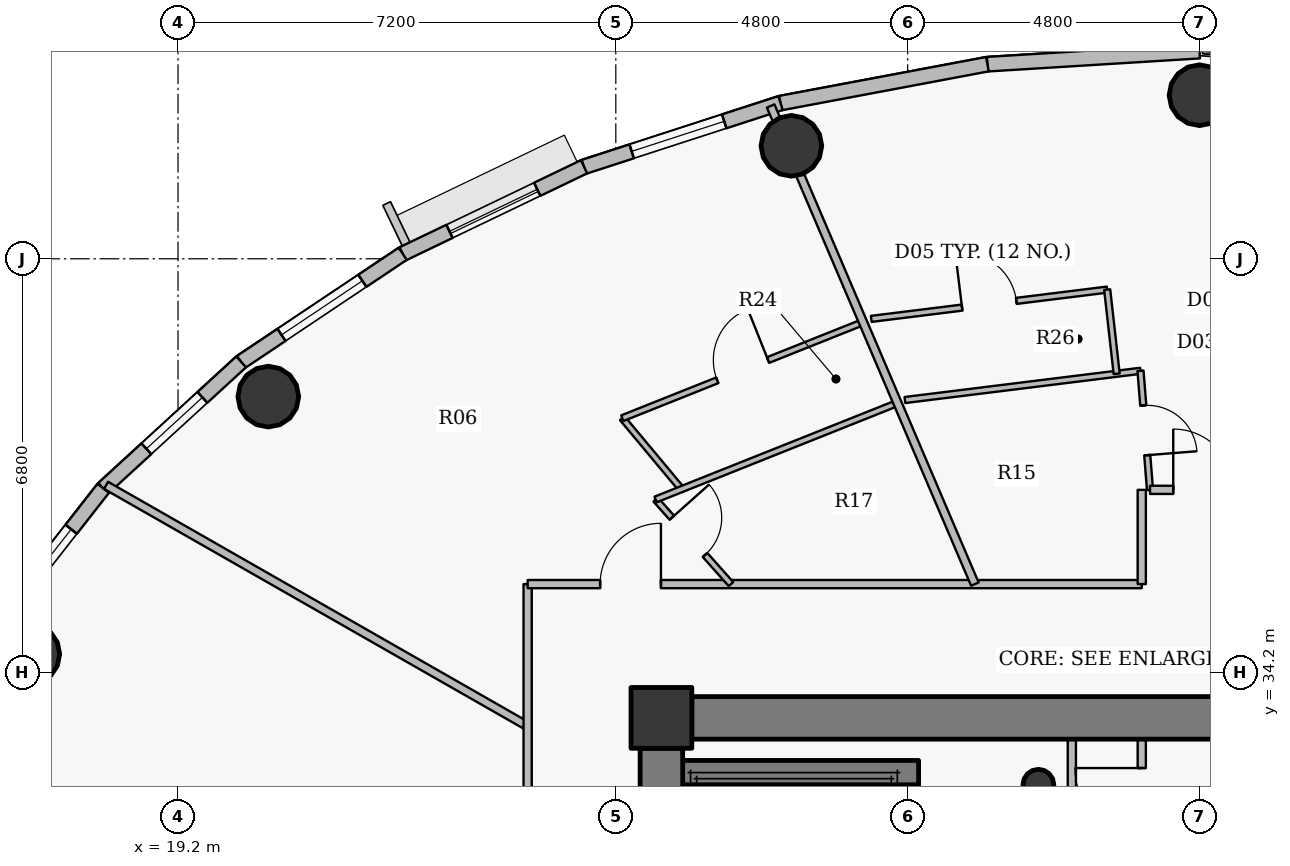
"""IFC4 building model, lengths in metres.
Left out: names, types, materials, properties, quantities, classifications, styles, units other than length and angle.
Written with IfcOpenShell. Run it as: python <this file> out.ifc"""

import sys

from ifc_helpers import new_model, si_unit, direction, frame, frame_2d, origin, origin_2d, place, context, subcontext, project, spatial, rectangle, hollow_circle, extrude, source, transform, mapped, element, fill, save


model = new_model("IFC4")
c1 = context("Model", 3, precision=1e-05, world=origin(), true_north=direction((0.0, 1.0)))
c2 = subcontext(c1, "Body", "Model", "MODEL_VIEW")
j1 = project(units=[si_unit("LENGTHUNIT", "METRE"), si_unit("PLANEANGLEUNIT", "RADIAN")], contexts=[c1])
p1 = place(None, origin())
s1 = spatial("IfcSite", under=j1, at=p1, CompositionType="ELEMENT")
p2 = place(p1, origin())
s2 = spatial("IfcBuilding", under=s1, at=p2, CompositionType="ELEMENT")
p3 = place(p2, frame((0.0, 0.0, 295.5)))
s3 = spatial("IfcBuildingStorey", under=s2, at=p3, CompositionType="ELEMENT", Elevation=295.5)
p4 = place(p3, frame((27.15, 33.45, 0.0), z_axis=(0.0, 0.0, 1.0), x_axis=(1.0, 0.0, 0.0)))
e1 = element("IfcColumn", 1, at=p4, inside=s3, PredefinedType="COLUMN", context=c2, shape_type="SweptSolid", body=[
    extrude(rectangle(XDim=1.0, YDim=1.0, at=origin_2d()), origin(), (0.0, 0.0, 1.0), 3.75),
])
p5 = place(p3, frame((33.35, 32.35, 0.0), z_axis=(0.0, 0.0, 1.0), x_axis=(1.0, 0.0, 0.0)))
e2 = element("IfcColumn", 2, at=p5, inside=s3, PredefinedType="COLUMN", context=c2, shape_type="SweptSolid", body=[
    extrude(hollow_circle(Radius=0.254, WallThickness=0.02, at=origin_2d()), origin(), (0.0, 0.0, 1.0), 3.75),
])
p6 = place(p3, frame((31.18, 27.8, 0.0), z_axis=(0.0, 0.0, 1.0), x_axis=(0.0, 1.0, 0.0)))
e3 = element("IfcWall", 3, at=p6, inside=s3, PredefinedType="SHEAR", context=c2, shape_type="SweptSolid", body=[
    extrude(rectangle(XDim=4.75, YDim=0.4, at=frame_2d((2.375, 0.0))), origin(), (0.0, 0.0, 1.0), 3.75),
])
p7 = place(p3, frame((27.25, 32.55, 0.0), z_axis=(0.0, 0.0, 1.0), x_axis=(1.0, 0.0, 0.0)))
e4 = element("IfcWall", 4, at=p7, inside=s3, PredefinedType="SHEAR", context=c2, shape_type="SweptSolid", body=[
    extrude(rectangle(XDim=4.13, YDim=0.4, at=frame_2d((2.065, 0.0))), origin(), (0.0, 0.0, 1.0), 3.75),
])
p8 = place(p3, frame((27.65, 33.45, 0.0), z_axis=(0.0, 0.0, 1.0), x_axis=(1.0, 0.0, 0.0)))
e5 = element("IfcWall", 5, at=p8, inside=s3, PredefinedType="SHEAR", context=c2, shape_type="SweptSolid", body=[
    extrude(rectangle(XDim=16.7, YDim=0.7, at=frame_2d((8.35, 0.0))), origin(), (0.0, 0.0, 1.0), 3.05),
])
p9 = place(p8, frame((12.775, 0.0, 0.0)))
e6 = element("IfcOpeningElement", 6, at=p9, cuts=e5, PredefinedType="OPENING", context=c2, shape_type="SweptSolid", body=[
    extrude(rectangle(XDim=1.15, YDim=2.15, at=origin_2d()), frame((0.575, 0.36, 1.075), z_axis=(0.0, -1.0, 0.0), x_axis=(1.0, 0.0, 0.0)), (0.0, 0.0, 1.0), 0.72),
])
p10 = place(p3, frame((27.15, 21.05, 0.0), z_axis=(0.0, 0.0, 1.0), x_axis=(0.0, 1.0, 0.0)))
e7 = element("IfcWall", 7, at=p10, inside=s3, PredefinedType="SHEAR", context=c2, shape_type="SweptSolid", body=[
    extrude(rectangle(XDim=11.9, YDim=0.7, at=frame_2d((5.95, 0.0))), origin(), (0.0, 0.0, 1.0), 3.05),
])
for number, where, z_axis, x_axis in (
    (8, (36.0, 43.69, 0.0), (0.0, 0.0, 1.0), (1.0, 0.0, 0.0)),
    (9, (29.288, 42.858, 0.0), (0.0, 0.0, 1.0), (1.0, 0.0, 0.0)),
    (10, (20.685, 38.733, 0.0), (0.0, 0.0, 1.0), (1.0, 0.0, 0.0)),
    (11, (16.754, 34.5, 0.0), (0.0, 0.0, 1.0), (1.0, 0.0, 0.0)),
):
    element("IfcColumn", number, at=place(p3, frame(where, z_axis=z_axis, x_axis=x_axis)), inside=s3, PredefinedType="COLUMN", context=c2, shape_type="SweptSolid", body=[
        extrude(hollow_circle(Radius=0.5, WallThickness=0.032, at=origin_2d()), origin(), (0.0, 0.0, 1.0), 3.75),
    ])
p11 = place(p3, frame((32.511, 44.2, 0.0), z_axis=(0.0, 0.0, 1.0), x_axis=(0.998104946479, 0.061534671648, 0.0)))
e12 = element("IfcWall", 12, at=p11, inside=s3, PredefinedType="SOLIDWALL", context=c2, shape_type="SweptSolid", body=[
    extrude(rectangle(XDim=3.495, YDim=0.24, at=frame_2d((1.748, 0.0))), origin(), (0.0, 0.0, 1.0), 3.5),
])
p12 = place(p3, frame((29.109, 43.56, 0.0), z_axis=(0.0, 0.0, 1.0), x_axis=(0.982782655757, 0.184765395959, 0.0)))
e13 = element("IfcWall", 13, at=p12, inside=s3, PredefinedType="SOLIDWALL", context=c2, shape_type="SweptSolid", body=[
    extrude(rectangle(XDim=3.462, YDim=0.24, at=frame_2d((1.731, 0.0))), origin(), (0.0, 0.0, 1.0), 3.5),
])
p13 = place(p3, frame((25.877, 42.512, 0.0), z_axis=(0.0, 0.0, 1.0), x_axis=(0.95123136723, 0.308478339592, 0.0)))
e14 = element("IfcWall", 14, at=p13, inside=s3, PredefinedType="SOLIDWALL", context=c2, shape_type="SweptSolid", body=[
    extrude(rectangle(XDim=3.398, YDim=0.24, at=frame_2d((1.699, 0.0))), origin(), (0.0, 0.0, 1.0), 3.5),
])
p14 = place(p13, frame((0.824, 0.0, 0.9)))
e15 = element("IfcOpeningElement", 15, at=p14, cuts=e14, PredefinedType="OPENING", context=c2, shape_type="SweptSolid", body=[
    extrude(rectangle(XDim=1.6, YDim=1.75, at=origin_2d()), frame((0.8, 0.13, 0.875), z_axis=(0.0, -1.0, 0.0), x_axis=(1.0, 0.0, 0.0)), (0.0, 0.0, 1.0), 0.26),
])
p15 = place(p3, frame((22.896, 41.082, 0.0), z_axis=(0.0, 0.0, 1.0), x_axis=(0.901573741254, 0.43262546051, 0.0)))
e16 = element("IfcWall", 16, at=p15, inside=s3, PredefinedType="SOLIDWALL", context=c2, shape_type="SweptSolid", body=[
    extrude(rectangle(XDim=3.307, YDim=0.24, at=frame_2d((1.653, 0.0))), origin(), (0.0, 0.0, 1.0), 3.5),
])
p16 = place(p15, frame((0.854, 0.0, 0.9)))
e17 = element("IfcOpeningElement", 17, at=p16, cuts=e16, PredefinedType="OPENING", context=c2, shape_type="SweptSolid", body=[
    extrude(rectangle(XDim=1.6, YDim=1.75, at=origin_2d()), frame((0.8, 0.13, 0.875), z_axis=(0.0, -1.0, 0.0), x_axis=(1.0, 0.0, 0.0)), (0.0, 0.0, 1.0), 0.26),
])
p17 = place(p3, frame((20.238, 39.304, 0.0), z_axis=(0.0, 0.0, 1.0), x_axis=(0.831250592635, 0.55589787933, 0.0)))
e18 = element("IfcWall", 18, at=p17, inside=s3, PredefinedType="SOLIDWALL", context=c2, shape_type="SweptSolid", body=[
    extrude(rectangle(XDim=3.197, YDim=0.24, at=frame_2d((1.599, 0.0))), origin(), (0.0, 0.0, 1.0), 3.5),
])
p18 = place(p17, frame((0.799, 0.0, 0.9)))
e19 = element("IfcOpeningElement", 19, at=p18, cuts=e18, PredefinedType="OPENING", context=c2, shape_type="SweptSolid", body=[
    extrude(rectangle(XDim=1.6, YDim=1.75, at=origin_2d()), frame((0.8, 0.13, 0.875), z_axis=(0.0, -1.0, 0.0), x_axis=(1.0, 0.0, 0.0)), (0.0, 0.0, 1.0), 0.26),
])
p19 = place(p3, frame((17.97, 37.225, 0.0), z_axis=(0.0, 0.0, 1.0), x_axis=(0.737068506972, 0.675818034703, 0.0)))
e20 = element("IfcWall", 20, at=p19, inside=s3, PredefinedType="SOLIDWALL", context=c2, shape_type="SweptSolid", body=[
    extrude(rectangle(XDim=3.077, YDim=0.24, at=frame_2d((1.539, 0.0))), origin(), (0.0, 0.0, 1.0), 3.5),
])
p20 = place(p19, frame((0.963, 0.0, 0.9)))
e21 = element("IfcOpeningElement", 21, at=p20, cuts=e20, PredefinedType="OPENING", context=c2, shape_type="SweptSolid", body=[
    extrude(rectangle(XDim=1.25, YDim=1.65, at=origin_2d()), frame((0.625, 0.13, 0.825), z_axis=(0.0, -1.0, 0.0), x_axis=(1.0, 0.0, 0.0)), (0.0, 0.0, 1.0), 0.26),
])
p21 = place(p3, frame((16.146, 34.895, 0.0), z_axis=(0.0, 0.0, 1.0), x_axis=(0.616337186556, 0.787482363275, 0.0)))
e22 = element("IfcWall", 22, at=p21, inside=s3, PredefinedType="SOLIDWALL", context=c2, shape_type="SweptSolid", body=[
    extrude(rectangle(XDim=2.958, YDim=0.24, at=frame_2d((1.479, 0.0))), origin(), (0.0, 0.0, 1.0), 3.5),
])
p22 = place(p21, frame((0.854, 0.0, 0.9)))
e23 = element("IfcOpeningElement", 23, at=p22, cuts=e22, PredefinedType="OPENING", context=c2, shape_type="SweptSolid", body=[
    extrude(rectangle(XDim=1.25, YDim=1.65, at=origin_2d()), frame((0.625, 0.13, 0.825), z_axis=(0.0, -1.0, 0.0), x_axis=(1.0, 0.0, 0.0)), (0.0, 0.0, 1.0), 0.26),
])
p23 = place(p3, frame((18.016, 37.274, 0.0), z_axis=(0.0, 0.0, 1.0), x_axis=(0.868277005727, -0.496079672357, 0.0)))
e24 = element("IfcWall", 24, at=p23, inside=s3, PredefinedType="PARTITIONING", context=c2, shape_type="SweptSolid", body=[
    extrude(rectangle(XDim=7.985, YDim=0.135, at=frame_2d((3.993, 0.0))), origin(), (0.0, 0.0, 1.0), 2.985),
])
p24 = place(p3, frame((24.95, 31.65, 0.0), z_axis=(0.0, 0.0, 1.0), x_axis=(0.0, 1.0, 0.0)))
e25 = element("IfcWall", 25, at=p24, inside=s3, PredefinedType="PARTITIONING", context=c2, shape_type="SweptSolid", body=[
    extrude(rectangle(XDim=4.0, YDim=0.135, at=frame_2d((2.0, 0.0))), origin(), (0.0, 0.0, 1.0), 3.035),
])
p25 = place(p3, frame((24.95, 35.65, 0.0), z_axis=(0.0, 0.0, 1.0), x_axis=(1.0, 0.0, 0.0)))
e26 = element("IfcWall", 26, at=p25, inside=s3, PredefinedType="PARTITIONING", context=c2, shape_type="SweptSolid", body=[
    extrude(rectangle(XDim=10.1, YDim=0.135, at=frame_2d((5.05, 0.0))), origin(), (0.0, 0.0, 1.0), 3.035),
])
p26 = place(p25, frame((1.192, 0.0, 0.0)))
e27 = element("IfcOpeningElement", 27, at=p26, cuts=e26, PredefinedType="OPENING", context=c2, shape_type="SweptSolid", body=[
    extrude(rectangle(XDim=1.0, YDim=2.15, at=origin_2d()), frame((0.5, 0.078, 1.075), z_axis=(0.0, -1.0, 0.0), x_axis=(1.0, 0.0, 0.0)), (0.0, 0.0, 1.0), 0.155),
])
p27 = place(p3, frame((26.507, 38.378, 0.0), z_axis=(0.0, 0.0, 1.0), x_axis=(0.640626707989, -0.767852473468, 0.0)))
e28 = element("IfcWall", 28, at=p27, inside=s3, PredefinedType="PARTITIONING", context=c2, shape_type="SweptSolid", body=[
    extrude(rectangle(XDim=1.52, YDim=0.1, at=frame_2d((0.76, 0.0))), origin(), (0.0, 0.0, 1.0), 3.5),
])
p28 = place(p3, frame((26.507, 38.378, 0.0), z_axis=(0.0, 0.0, 1.0), x_axis=(0.928788495711, 0.370610213345, 0.0)))
e29 = element("IfcWall", 29, at=p28, inside=s3, PredefinedType="PARTITIONING", context=c2, shape_type="SweptSolid", body=[
    extrude(rectangle(XDim=4.261, YDim=0.1, at=frame_2d((2.131, 0.0))), origin(), (0.0, 0.0, 1.0), 3.035),
])
p29 = place(p28, frame((1.681, 0.0, 0.0)))
e30 = element("IfcOpeningElement", 30, at=p29, cuts=e29, PredefinedType="OPENING", context=c2, shape_type="SweptSolid", body=[
    extrude(rectangle(XDim=0.9, YDim=2.1, at=origin_2d()), frame((0.45, 0.06, 1.05), z_axis=(0.0, -1.0, 0.0), x_axis=(1.0, 0.0, 0.0)), (0.0, 0.0, 1.0), 0.12),
])
p30 = place(p3, frame((27.055, 37.042, 0.0), z_axis=(0.0, 0.0, 1.0), x_axis=(0.665119722178, -0.746736737525, 0.0)))
e31 = element("IfcWall", 31, at=p30, inside=s3, PredefinedType="PARTITIONING", context=c2, shape_type="SweptSolid", body=[
    extrude(rectangle(XDim=1.864, YDim=0.1, at=frame_2d((0.932, 0.0))), origin(), (0.0, 0.0, 1.0), 3.5),
])
p31 = place(p30, frame((0.401, 0.0, 0.0)))
e32 = element("IfcOpeningElement", 32, at=p31, cuts=e31, PredefinedType="OPENING", context=c2, shape_type="SweptSolid", body=[
    extrude(rectangle(XDim=0.82, YDim=2.1, at=origin_2d()), frame((0.41, 0.06, 1.05), z_axis=(0.0, -1.0, 0.0), x_axis=(1.0, 0.0, 0.0)), (0.0, 0.0, 1.0), 0.12),
])
p32 = place(p3, frame((27.055, 37.042, 0.0), z_axis=(0.0, 0.0, 1.0), x_axis=(0.928814416372, 0.370545246819, 0.0)))
e33 = element("IfcWall", 33, at=p32, inside=s3, PredefinedType="PARTITIONING", context=c2, shape_type="SweptSolid", body=[
    extrude(rectangle(XDim=4.283, YDim=0.1, at=frame_2d((2.141, 0.0))), origin(), (0.0, 0.0, 1.0), 3.035),
])
p33 = place(p3, frame((28.946, 43.513, 0.0), z_axis=(0.0, 0.0, 1.0), x_axis=(0.392833513872, -0.919609607594, 0.0)))
e34 = element("IfcWall", 34, at=p33, inside=s3, PredefinedType="PARTITIONING", context=c2, shape_type="SweptSolid", body=[
    extrude(rectangle(XDim=8.55, YDim=0.135, at=frame_2d((4.275, 0.0))), origin(), (0.0, 0.0, 1.0), 3.035),
])
p34 = place(p3, frame((30.601, 40.011, 0.0), z_axis=(0.0, 0.0, 1.0), x_axis=(0.992391758007, 0.123120260886, 0.0)))
e35 = element("IfcWall", 35, at=p34, inside=s3, PredefinedType="PARTITIONING", context=c2, shape_type="SweptSolid", body=[
    extrude(rectangle(XDim=3.91, YDim=0.1, at=frame_2d((1.955, 0.0))), origin(), (0.0, 0.0, 1.0), 3.035),
])
p35 = place(p34, frame((1.505, 0.0, 0.0)))
e36 = element("IfcOpeningElement", 36, at=p35, cuts=e35, PredefinedType="OPENING", context=c2, shape_type="SweptSolid", body=[
    extrude(rectangle(XDim=0.9, YDim=2.1, at=origin_2d()), frame((0.45, 0.06, 1.05), z_axis=(0.0, -1.0, 0.0), x_axis=(1.0, 0.0, 0.0)), (0.0, 0.0, 1.0), 0.12),
])
p36 = place(p3, frame((31.155, 38.677, 0.0), z_axis=(0.0, 0.0, 1.0), x_axis=(0.992398620659, 0.123064932921, 0.0)))
e37 = element("IfcWall", 37, at=p36, inside=s3, PredefinedType="PARTITIONING", context=c2, shape_type="SweptSolid", body=[
    extrude(rectangle(XDim=3.904, YDim=0.1, at=frame_2d((1.952, 0.0))), origin(), (0.0, 0.0, 1.0), 3.035),
])
p37 = place(p3, frame((33.9, 27.56, 0.0), z_axis=(0.0, 0.0, 1.0), x_axis=(0.0, 1.0, 0.0)))
e38 = element("IfcWall", 38, at=p37, inside=s3, PredefinedType="PARTITIONING", context=c2, shape_type="SweptSolid", body=[
    extrude(rectangle(XDim=5.54, YDim=0.135, at=frame_2d((2.77, 0.0))), origin(), (0.0, 0.0, 1.0), 3.085),
])
p38 = place(p37, frame((2.22, 0.0, 0.0)))
e39 = element("IfcOpeningElement", 39, at=p38, cuts=e38, PredefinedType="OPENING", context=c2, shape_type="SweptSolid", body=[
    extrude(rectangle(XDim=1.1, YDim=2.15, at=origin_2d()), frame((0.55, 0.078, 1.075), z_axis=(0.0, -1.0, 0.0), x_axis=(1.0, 0.0, 0.0)), (0.0, 0.0, 1.0), 0.155),
])
p39 = place(p3, frame((34.481, 40.493, 0.0), z_axis=(0.0, 0.0, 1.0), x_axis=(0.111835884353, -0.993726690278, 0.0)))
e40 = element("IfcWall", 40, at=p39, inside=s3, PredefinedType="PARTITIONING", context=c2, shape_type="SweptSolid", body=[
    extrude(rectangle(XDim=1.393, YDim=0.1, at=frame_2d((0.696, 0.0))), origin(), (0.0, 0.0, 1.0), 3.035),
])
p40 = place(p3, frame((35.029, 39.158, 0.0), z_axis=(0.0, 0.0, 1.0), x_axis=(0.079557473452, -0.996830280649, 0.0)))
e41 = element("IfcWall", 41, at=p40, inside=s3, PredefinedType="PARTITIONING", context=c2, shape_type="SweptSolid", body=[
    extrude(rectangle(XDim=1.964, YDim=0.1, at=frame_2d((0.982, 0.0))), origin(), (0.0, 0.0, 1.0), 3.5),
])
p41 = place(p40, frame((0.572, 0.0, 0.0)))
e42 = element("IfcOpeningElement", 42, at=p41, cuts=e41, PredefinedType="OPENING", context=c2, shape_type="SweptSolid", body=[
    extrude(rectangle(XDim=0.82, YDim=2.1, at=origin_2d()), frame((0.41, 0.06, 1.05), z_axis=(0.0, -1.0, 0.0), x_axis=(1.0, 0.0, 0.0)), (0.0, 0.0, 1.0), 0.12),
])
p42 = place(p3, frame((35.05, 31.05, 0.0), z_axis=(0.0, 0.0, 1.0), x_axis=(0.0, 1.0, 0.0)))
e43 = element("IfcWall", 43, at=p42, inside=s3, PredefinedType="PARTITIONING", context=c2, shape_type="SweptSolid", body=[
    extrude(rectangle(XDim=2.05, YDim=0.135, at=frame_2d((1.025, 0.0))), origin(), (0.0, 0.0, 1.0), 3.085),
])
p43 = place(p42, frame((0.475, 0.0, 0.0)))
e44 = element("IfcOpeningElement", 44, at=p43, cuts=e43, PredefinedType="OPENING", context=c2, shape_type="SweptSolid", body=[
    extrude(rectangle(XDim=1.1, YDim=2.15, at=origin_2d()), frame((0.55, 0.078, 1.075), z_axis=(0.0, -1.0, 0.0), x_axis=(1.0, 0.0, 0.0)), (0.0, 0.0, 1.0), 0.155),
])
p44 = place(p3, frame((35.05, 35.65, 0.0), z_axis=(0.0, 0.0, 1.0), x_axis=(0.0, 1.0, 0.0)))
e45 = element("IfcWall", 45, at=p44, inside=s3, PredefinedType="PARTITIONING", context=c2, shape_type="SweptSolid", body=[
    extrude(rectangle(XDim=1.55, YDim=0.135, at=frame_2d((0.775, 0.0))), origin(), (0.0, 0.0, 1.0), 3.5),
])
p45 = place(p3, frame((35.186, 37.2, 0.0), z_axis=(0.0, 0.0, 1.0), x_axis=(1.0, 0.0, 0.0)))
e46 = element("IfcWall", 46, at=p45, inside=s3, PredefinedType="PARTITIONING", context=c2, shape_type="SweptSolid", body=[
    extrude(rectangle(XDim=1.764, YDim=0.135, at=frame_2d((0.882, 0.0))), origin(), (0.0, 0.0, 1.0), 3.035),
])
p46 = place(p45, frame((0.382, 0.0, 0.0)))
e47 = element("IfcOpeningElement", 47, at=p46, cuts=e46, PredefinedType="OPENING", context=c2, shape_type="SweptSolid", body=[
    extrude(rectangle(XDim=1.0, YDim=2.15, at=origin_2d()), frame((0.5, 0.078, 1.075), z_axis=(0.0, -1.0, 0.0), x_axis=(1.0, 0.0, 0.0)), (0.0, 0.0, 1.0), 0.155),
])
p47 = place(p3, frame((27.64, 33.8, 0.0), z_axis=(0.0, 0.0, 1.0), x_axis=(-1.0, 0.0, 0.0)))
e48 = element("IfcWall", 48, at=p47, inside=s3, PredefinedType="PARTITIONING", context=c2, shape_type="SweptSolid", body=[
    extrude(rectangle(XDim=0.84, YDim=0.135, at=frame_2d((0.42, 0.0))), origin(), (0.0, 0.0, 1.0), 3.035),
])
p48 = place(p3, frame((26.8, 33.492, 0.0), z_axis=(0.0, 0.0, 1.0), x_axis=(0.0, -1.0, 0.0)))
e49 = element("IfcWall", 49, at=p48, inside=s3, PredefinedType="PARTITIONING", context=c2, shape_type="SweptSolid", body=[
    extrude(rectangle(XDim=0.532, YDim=0.135, at=frame_2d((0.266, 0.0))), origin(), (0.0, 0.0, 1.0), 3.5),
])
m1 = source(origin(), c2, "Body", "SweptSolid", [
    extrude(rectangle(XDim=1.6, YDim=1.75, at=origin_2d()), frame((0.8, 0.03, 0.875), z_axis=(0.0, -1.0, 0.0), x_axis=(1.0, 0.0, 0.0)), (0.0, 0.0, 1.0), 0.06),
])
p49 = place(p14, origin())
e50 = element("IfcWindow", 50, at=p49, inside=s3, PartitioningType="DOUBLE_PANEL_VERTICAL", PredefinedType="WINDOW", context=c2, shape_type="MappedRepresentation", body=[
    mapped(m1, transform((0.0, 0.0, 0.0), x_axis=(1.0, 0.0, 0.0), y_axis=(0.0, 1.0, 0.0), z_axis=(0.0, 0.0, 1.0), scale=1.0)),
])
fill(e15, e50)
p50 = place(p16, origin())
e51 = element("IfcWindow", 51, at=p50, inside=s3, PartitioningType="DOUBLE_PANEL_VERTICAL", PredefinedType="WINDOW", context=c2, shape_type="MappedRepresentation", body=[
    mapped(m1, transform((0.0, 0.0, 0.0), x_axis=(1.0, 0.0, 0.0), y_axis=(0.0, 1.0, 0.0), z_axis=(0.0, 0.0, 1.0), scale=1.0)),
])
fill(e17, e51)
p51 = place(p18, origin())
e52 = element("IfcWindow", 52, at=p51, inside=s3, PartitioningType="DOUBLE_PANEL_VERTICAL", PredefinedType="WINDOW", context=c2, shape_type="MappedRepresentation", body=[
    mapped(m1, transform((0.0, 0.0, 0.0), x_axis=(1.0, 0.0, 0.0), y_axis=(0.0, 1.0, 0.0), z_axis=(0.0, 0.0, 1.0), scale=1.0)),
])
fill(e19, e52)
m2 = source(origin(), c2, "Body", "SweptSolid", [
    extrude(rectangle(XDim=1.25, YDim=1.65, at=origin_2d()), frame((0.625, 0.03, 0.825), z_axis=(0.0, -1.0, 0.0), x_axis=(1.0, 0.0, 0.0)), (0.0, 0.0, 1.0), 0.06),
])
p52 = place(p20, origin())
e53 = element("IfcWindow", 53, at=p52, inside=s3, PartitioningType="SINGLE_PANEL", PredefinedType="WINDOW", context=c2, shape_type="MappedRepresentation", body=[
    mapped(m2, transform((0.0, 0.0, 0.0), x_axis=(1.0, 0.0, 0.0), y_axis=(0.0, 1.0, 0.0), z_axis=(0.0, 0.0, 1.0), scale=1.0)),
])
fill(e21, e53)
p53 = place(p22, origin())
e54 = element("IfcWindow", 54, at=p53, inside=s3, PartitioningType="SINGLE_PANEL", PredefinedType="WINDOW", context=c2, shape_type="MappedRepresentation", body=[
    mapped(m2, transform((0.0, 0.0, 0.0), x_axis=(1.0, 0.0, 0.0), y_axis=(0.0, 1.0, 0.0), z_axis=(0.0, 0.0, 1.0), scale=1.0)),
])
fill(e23, e54)
m3 = source(origin(), c2, "Body", "SweptSolid", [
    extrude(rectangle(XDim=1.0, YDim=2.15, at=origin_2d()), frame((0.5, 0.025, 1.075), z_axis=(0.0, -1.0, 0.0), x_axis=(1.0, 0.0, 0.0)), (0.0, 0.0, 1.0), 0.05),
])
p54 = place(p46, origin())
e55 = element("IfcDoor", 55, at=p54, inside=s3, OperationType="SINGLE_SWING_LEFT", PredefinedType="DOOR", context=c2, shape_type="MappedRepresentation", body=[
    mapped(m3, transform((0.0, 0.0, 0.0), x_axis=(1.0, 0.0, 0.0), y_axis=(0.0, 1.0, 0.0), z_axis=(0.0, 0.0, 1.0), scale=1.0)),
])
fill(e47, e55)
m4 = source(origin(), c2, "Body", "SweptSolid", [
    extrude(rectangle(XDim=0.82, YDim=2.1, at=origin_2d()), frame((0.41, 0.025, 1.05), z_axis=(0.0, -1.0, 0.0), x_axis=(1.0, 0.0, 0.0)), (0.0, 0.0, 1.0), 0.05),
])
p55 = place(p41, origin())
e56 = element("IfcDoor", 56, at=p55, inside=s3, OperationType="SINGLE_SWING_RIGHT", PredefinedType="DOOR", context=c2, shape_type="MappedRepresentation", body=[
    mapped(m4, transform((0.0, 0.0, 0.0), x_axis=(1.0, 0.0, 0.0), y_axis=(0.0, 1.0, 0.0), z_axis=(0.0, 0.0, 1.0), scale=1.0)),
])
fill(e42, e56)
m5 = source(origin(), c2, "Body", "SweptSolid", [
    extrude(rectangle(XDim=0.9, YDim=2.1, at=origin_2d()), frame((0.45, 0.025, 1.05), z_axis=(0.0, -1.0, 0.0), x_axis=(1.0, 0.0, 0.0)), (0.0, 0.0, 1.0), 0.05),
])
p56 = place(p35, origin())
e57 = element("IfcDoor", 57, at=p56, inside=s3, OperationType="SINGLE_SWING_LEFT", PredefinedType="DOOR", context=c2, shape_type="MappedRepresentation", body=[
    mapped(m5, transform((0.0, 0.0, 0.0), x_axis=(1.0, 0.0, 0.0), y_axis=(0.0, 1.0, 0.0), z_axis=(0.0, 0.0, 1.0), scale=1.0)),
])
fill(e36, e57)
p57 = place(p26, origin())
e58 = element("IfcDoor", 58, at=p57, inside=s3, OperationType="SINGLE_SWING_RIGHT", PredefinedType="DOOR", context=c2, shape_type="MappedRepresentation", body=[
    mapped(m3, transform((0.0, 0.0, 0.0), x_axis=(1.0, 0.0, 0.0), y_axis=(0.0, 1.0, 0.0), z_axis=(0.0, 0.0, 1.0), scale=1.0)),
])
fill(e27, e58)
p58 = place(p31, origin())
e59 = element("IfcDoor", 59, at=p58, inside=s3, OperationType="SINGLE_SWING_LEFT", PredefinedType="DOOR", context=c2, shape_type="MappedRepresentation", body=[
    mapped(m4, transform((0.0, 0.0, 0.0), x_axis=(1.0, 0.0, 0.0), y_axis=(0.0, 1.0, 0.0), z_axis=(0.0, 0.0, 1.0), scale=1.0)),
])
fill(e32, e59)
p59 = place(p29, origin())
e60 = element("IfcDoor", 60, at=p59, inside=s3, OperationType="SINGLE_SWING_RIGHT", PredefinedType="DOOR", context=c2, shape_type="MappedRepresentation", body=[
    mapped(m5, transform((0.0, 0.0, 0.0), x_axis=(1.0, 0.0, 0.0), y_axis=(0.0, 1.0, 0.0), z_axis=(0.0, 0.0, 1.0), scale=1.0)),
])
fill(e30, e60)
m6 = source(origin(), c2, "Body", "SweptSolid", [
    extrude(rectangle(XDim=1.1, YDim=2.15, at=origin_2d()), frame((0.55, 0.025, 1.075), z_axis=(0.0, -1.0, 0.0), x_axis=(1.0, 0.0, 0.0)), (0.0, 0.0, 1.0), 0.05),
])
p60 = place(p43, origin())
e61 = element("IfcDoor", 61, at=p60, inside=s3, OperationType="SINGLE_SWING_RIGHT", PredefinedType="DOOR", context=c2, shape_type="MappedRepresentation", body=[
    mapped(m6, transform((0.0, 0.0, 0.0), x_axis=(1.0, 0.0, 0.0), y_axis=(0.0, 1.0, 0.0), z_axis=(0.0, 0.0, 1.0), scale=1.0)),
])
fill(e44, e61)
save(model, sys.argv[1])
